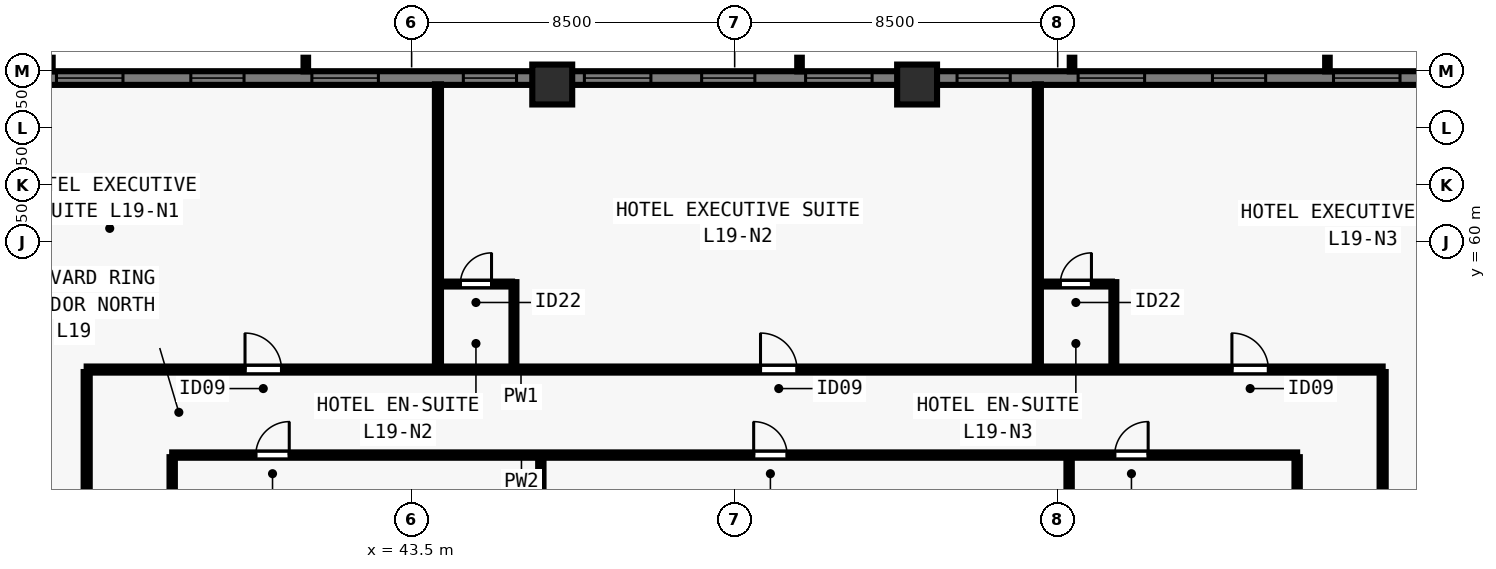
"""IFC4 building model, lengths in metres.
Left out: names, types, materials, properties, quantities, classifications, styles, units other than length and angle.
Written with IfcOpenShell. Run it as: python <this file> out.ifc"""

import sys

from ifc_helpers import new_model, si_unit, direction, frame, frame_2d, origin, origin_2d, place, context, subcontext, project, spatial, rectangle, extrude, element, fill, save


model = new_model("IFC4")
c1 = context("Model", 3, precision=1e-05, world=origin(), true_north=direction((0.0, 1.0)))
c2 = subcontext(c1, "Body", "Model", "MODEL_VIEW")
j1 = project(units=[si_unit("LENGTHUNIT", "METRE"), si_unit("PLANEANGLEUNIT", "RADIAN")], contexts=[c1])
p1 = place(None, origin())
s1 = spatial("IfcSite", under=j1, at=p1, CompositionType="ELEMENT")
p2 = place(p1, origin())
s2 = spatial("IfcBuilding", under=s1, at=p2, CompositionType="ELEMENT")
p3 = place(p2, frame((0.0, 0.0, 72.5)))
s3 = spatial("IfcBuildingStorey", under=s2, at=p3, CompositionType="ELEMENT", Elevation=72.5)
for number, where, z_axis, x_axis in (
    (1, (56.8, 64.15, 0.0), (0.0, 0.0, 1.0), (1.0, 0.0, 0.0)),
    (2, (47.2, 64.15, 0.0), (0.0, 0.0, 1.0), (1.0, 0.0, 0.0)),
):
    element("IfcColumn", number, at=place(p3, frame(where, z_axis=z_axis, x_axis=x_axis)), inside=s3, PredefinedType="COLUMN", context=c2, shape_type="SweptSolid", body=[
        extrude(rectangle(XDim=1.05, YDim=1.05, at=origin_2d()), origin(), (0.0, 0.0, 1.0), 3.5),
    ])
p4 = place(p3, frame((29.5, 64.32, 0.0), z_axis=(0.0, 0.0, 1.0), x_axis=(1.0, 0.0, 0.0)))
e3 = element("IfcWall", 3, at=p4, inside=s3, PredefinedType="SOLIDWALL", context=c2, shape_type="SweptSolid", body=[
    extrude(rectangle(XDim=44.662, YDim=0.36, at=frame_2d((22.331, 0.0))), origin(), (0.0, 0.0, 1.0), 3.28),
])
p5 = place(p4, frame((4.655, 0.0, 0.8)))
e4 = element("IfcOpeningElement", 4, at=p5, cuts=e3, PredefinedType="OPENING", context=c2, shape_type="SweptSolid", body=[
    extrude(rectangle(XDim=1.75, YDim=1.544, at=frame_2d((0.875, 0.772))), frame((0.0, 0.19, 0.0), z_axis=(0.0, -1.0, 0.0), x_axis=(1.0, 0.0, 0.0)), (0.0, 0.0, 1.0), 0.38),
])
p6 = place(p4, frame((8.19, 0.0, 0.8)))
e5 = element("IfcOpeningElement", 5, at=p6, cuts=e3, PredefinedType="OPENING", context=c2, shape_type="SweptSolid", body=[
    extrude(rectangle(XDim=1.4, YDim=1.544, at=frame_2d((0.7, 0.772))), frame((0.0, 0.19, 0.0), z_axis=(0.0, -1.0, 0.0), x_axis=(1.0, 0.0, 0.0)), (0.0, 0.0, 1.0), 0.38),
])
p7 = place(p4, frame((11.375, 0.0, 0.8)))
e6 = element("IfcOpeningElement", 6, at=p7, cuts=e3, PredefinedType="OPENING", context=c2, shape_type="SweptSolid", body=[
    extrude(rectangle(XDim=1.75, YDim=1.544, at=frame_2d((0.875, 0.772))), frame((0.0, 0.19, 0.0), z_axis=(0.0, -1.0, 0.0), x_axis=(1.0, 0.0, 0.0)), (0.0, 0.0, 1.0), 0.38),
])
p8 = place(p4, frame((15.361, 0.0, 0.8)))
e7 = element("IfcOpeningElement", 7, at=p8, cuts=e3, PredefinedType="OPENING", context=c2, shape_type="SweptSolid", body=[
    extrude(rectangle(XDim=1.4, YDim=1.544, at=frame_2d((0.7, 0.772))), frame((0.0, 0.19, 0.0), z_axis=(0.0, -1.0, 0.0), x_axis=(1.0, 0.0, 0.0)), (0.0, 0.0, 1.0), 0.38),
])
p9 = place(p4, frame((18.546, 0.0, 0.8)))
e8 = element("IfcOpeningElement", 8, at=p9, cuts=e3, PredefinedType="OPENING", context=c2, shape_type="SweptSolid", body=[
    extrude(rectangle(XDim=1.75, YDim=1.544, at=frame_2d((0.875, 0.772))), frame((0.0, 0.19, 0.0), z_axis=(0.0, -1.0, 0.0), x_axis=(1.0, 0.0, 0.0)), (0.0, 0.0, 1.0), 0.38),
])
p10 = place(p4, frame((21.631, 0.0, 0.8)))
e9 = element("IfcOpeningElement", 9, at=p10, cuts=e3, PredefinedType="OPENING", context=c2, shape_type="SweptSolid", body=[
    extrude(rectangle(XDim=1.4, YDim=1.544, at=frame_2d((0.7, 0.772))), frame((0.0, 0.19, 0.0), z_axis=(0.0, -1.0, 0.0), x_axis=(1.0, 0.0, 0.0)), (0.0, 0.0, 1.0), 0.38),
])
p11 = place(p4, frame((24.366, 0.0, 0.8)))
e10 = element("IfcOpeningElement", 10, at=p11, cuts=e3, PredefinedType="OPENING", context=c2, shape_type="SweptSolid", body=[
    extrude(rectangle(XDim=1.75, YDim=1.544, at=frame_2d((0.875, 0.772))), frame((0.0, 0.19, 0.0), z_axis=(0.0, -1.0, 0.0), x_axis=(1.0, 0.0, 0.0)), (0.0, 0.0, 1.0), 0.38),
])
p12 = place(p4, frame((28.351, 0.0, 0.8)))
e11 = element("IfcOpeningElement", 11, at=p12, cuts=e3, PredefinedType="OPENING", context=c2, shape_type="SweptSolid", body=[
    extrude(rectangle(XDim=1.4, YDim=1.544, at=frame_2d((0.7, 0.772))), frame((0.0, 0.19, 0.0), z_axis=(0.0, -1.0, 0.0), x_axis=(1.0, 0.0, 0.0)), (0.0, 0.0, 1.0), 0.38),
])
p13 = place(p4, frame((31.537, 0.0, 0.8)))
e12 = element("IfcOpeningElement", 12, at=p13, cuts=e3, PredefinedType="OPENING", context=c2, shape_type="SweptSolid", body=[
    extrude(rectangle(XDim=1.75, YDim=1.544, at=frame_2d((0.875, 0.772))), frame((0.0, 0.19, 0.0), z_axis=(0.0, -1.0, 0.0), x_axis=(1.0, 0.0, 0.0)), (0.0, 0.0, 1.0), 0.38),
])
p14 = place(p4, frame((35.072, 0.0, 0.8)))
e13 = element("IfcOpeningElement", 13, at=p14, cuts=e3, PredefinedType="OPENING", context=c2, shape_type="SweptSolid", body=[
    extrude(rectangle(XDim=1.4, YDim=1.544, at=frame_2d((0.7, 0.772))), frame((0.0, 0.19, 0.0), z_axis=(0.0, -1.0, 0.0), x_axis=(1.0, 0.0, 0.0)), (0.0, 0.0, 1.0), 0.38),
])
p15 = place(p4, frame((38.257, 0.0, 0.8)))
e14 = element("IfcOpeningElement", 14, at=p15, cuts=e3, PredefinedType="OPENING", context=c2, shape_type="SweptSolid", body=[
    extrude(rectangle(XDim=1.75, YDim=1.544, at=frame_2d((0.875, 0.772))), frame((0.0, 0.19, 0.0), z_axis=(0.0, -1.0, 0.0), x_axis=(1.0, 0.0, 0.0)), (0.0, 0.0, 1.0), 0.38),
])
p16 = place(p3, frame((34.95, 56.65, 0.0), z_axis=(0.0, 0.0, 1.0), x_axis=(1.0, 0.0, 0.0)))
e15 = element("IfcWall", 15, at=p16, inside=s3, PredefinedType="PARTITIONING", context=c2, shape_type="SweptSolid", body=[
    extrude(rectangle(XDim=34.1, YDim=0.16, at=frame_2d((17.05, 0.0))), origin(), (0.0, 0.0, 1.0), 3.28),
])
p17 = place(p16, frame((4.166, 0.0, 0.0)))
e16 = element("IfcOpeningElement", 16, at=p17, cuts=e15, PredefinedType="OPENING", context=c2, shape_type="SweptSolid", body=[
    extrude(rectangle(XDim=0.96, YDim=2.15, at=frame_2d((0.48, 1.075))), frame((0.0, 0.09, 0.0), z_axis=(0.0, -1.0, 0.0), x_axis=(1.0, 0.0, 0.0)), (0.0, 0.0, 1.0), 0.18),
])
p18 = place(p16, frame((17.73, 0.0, 0.0)))
e17 = element("IfcOpeningElement", 17, at=p18, cuts=e15, PredefinedType="OPENING", context=c2, shape_type="SweptSolid", body=[
    extrude(rectangle(XDim=0.96, YDim=2.15, at=frame_2d((0.48, 1.075))), frame((0.0, 0.09, 0.0), z_axis=(0.0, -1.0, 0.0), x_axis=(1.0, 0.0, 0.0)), (0.0, 0.0, 1.0), 0.18),
])
p19 = place(p16, frame((30.134, 0.0, 0.0)))
e18 = element("IfcOpeningElement", 18, at=p19, cuts=e15, PredefinedType="OPENING", context=c2, shape_type="SweptSolid", body=[
    extrude(rectangle(XDim=0.96, YDim=2.15, at=frame_2d((0.48, 1.075))), frame((0.0, 0.09, 0.0), z_axis=(0.0, -1.0, 0.0), x_axis=(1.0, 0.0, 0.0)), (0.0, 0.0, 1.0), 0.18),
])
p20 = place(p3, frame((34.95, 21.415, 0.0), z_axis=(0.0, 0.0, 1.0), x_axis=(0.0, 1.0, 0.0)))
e19 = element("IfcWall", 19, at=p20, inside=s3, PredefinedType="PARTITIONING", context=c2, shape_type="SweptSolid", body=[
    extrude(rectangle(XDim=35.17, YDim=0.16, at=frame_2d((17.585, 0.0))), origin(), (0.0, 0.0, 1.0), 3.28),
])
p21 = place(p20, frame((9.414, 0.0, 0.0)))
e20 = element("IfcOpeningElement", 20, at=p21, cuts=e19, PredefinedType="OPENING", context=c2, shape_type="SweptSolid", body=[
    extrude(rectangle(XDim=0.96, YDim=2.15, at=frame_2d((0.48, 1.075))), frame((0.0, 0.09, 0.0), z_axis=(0.0, -1.0, 0.0), x_axis=(1.0, 0.0, 0.0)), (0.0, 0.0, 1.0), 0.18),
])
p22 = place(p20, frame((26.814, 0.0, 0.0)))
e21 = element("IfcOpeningElement", 21, at=p22, cuts=e19, PredefinedType="OPENING", context=c2, shape_type="SweptSolid", body=[
    extrude(rectangle(XDim=0.96, YDim=2.15, at=frame_2d((0.48, 1.075))), frame((0.0, 0.09, 0.0), z_axis=(0.0, -1.0, 0.0), x_axis=(1.0, 0.0, 0.0)), (0.0, 0.0, 1.0), 0.18),
])
p23 = place(p3, frame((69.05, 21.415, 0.0), z_axis=(0.0, 0.0, 1.0), x_axis=(0.0, 1.0, 0.0)))
e22 = element("IfcWall", 22, at=p23, inside=s3, PredefinedType="PARTITIONING", context=c2, shape_type="SweptSolid", body=[
    extrude(rectangle(XDim=35.17, YDim=0.16, at=frame_2d((17.585, 0.0))), origin(), (0.0, 0.0, 1.0), 3.28),
])
p24 = place(p23, frame((9.746, 0.0, 0.0)))
e23 = element("IfcOpeningElement", 23, at=p24, cuts=e22, PredefinedType="OPENING", context=c2, shape_type="SweptSolid", body=[
    extrude(rectangle(XDim=0.96, YDim=2.15, at=frame_2d((0.48, 1.075))), frame((0.0, 0.09, 0.0), z_axis=(0.0, -1.0, 0.0), x_axis=(1.0, 0.0, 0.0)), (0.0, 0.0, 1.0), 0.18),
])
p25 = place(p23, frame((27.146, 0.0, 0.0)))
e24 = element("IfcOpeningElement", 24, at=p25, cuts=e22, PredefinedType="OPENING", context=c2, shape_type="SweptSolid", body=[
    extrude(rectangle(XDim=0.96, YDim=2.15, at=frame_2d((0.48, 1.075))), frame((0.0, 0.09, 0.0), z_axis=(0.0, -1.0, 0.0), x_axis=(1.0, 0.0, 0.0)), (0.0, 0.0, 1.0), 0.18),
])
p26 = place(p3, frame((37.2, 54.4, 0.0), z_axis=(0.0, 0.0, 1.0), x_axis=(1.0, 0.0, 0.0)))
e25 = element("IfcWall", 25, at=p26, inside=s3, PredefinedType="PARTITIONING", context=c2, shape_type="SweptSolid", body=[
    extrude(rectangle(XDim=29.6, YDim=0.14, at=frame_2d((14.8, 0.0))), origin(), (0.0, 0.0, 1.0), 3.28),
])
p27 = place(p26, frame((2.2, 0.0, 0.0)))
e26 = element("IfcOpeningElement", 26, at=p27, cuts=e25, PredefinedType="OPENING", context=c2, shape_type="SweptSolid", body=[
    extrude(rectangle(XDim=0.88, YDim=2.1, at=frame_2d((0.44, 1.05))), frame((0.0, 0.08, 0.0), z_axis=(0.0, -1.0, 0.0), x_axis=(1.0, 0.0, 0.0)), (0.0, 0.0, 1.0), 0.16),
])
p28 = place(p26, frame((15.3, 0.0, 0.0)))
e27 = element("IfcOpeningElement", 27, at=p28, cuts=e25, PredefinedType="OPENING", context=c2, shape_type="SweptSolid", body=[
    extrude(rectangle(XDim=0.88, YDim=2.1, at=frame_2d((0.44, 1.05))), frame((0.0, 0.08, 0.0), z_axis=(0.0, -1.0, 0.0), x_axis=(1.0, 0.0, 0.0)), (0.0, 0.0, 1.0), 0.16),
])
p29 = place(p26, frame((24.8, 0.0, 0.0)))
e28 = element("IfcOpeningElement", 28, at=p29, cuts=e25, PredefinedType="OPENING", context=c2, shape_type="SweptSolid", body=[
    extrude(rectangle(XDim=0.88, YDim=2.1, at=frame_2d((0.44, 1.05))), frame((0.0, 0.08, 0.0), z_axis=(0.0, -1.0, 0.0), x_axis=(1.0, 0.0, 0.0)), (0.0, 0.0, 1.0), 0.16),
])
p30 = place(p3, frame((37.2, 40.8, 0.0), z_axis=(0.0, 0.0, 1.0), x_axis=(0.0, 1.0, 0.0)))
e29 = element("IfcWall", 29, at=p30, inside=s3, PredefinedType="PARTITIONING", context=c2, shape_type="SweptSolid", body=[
    extrude(rectangle(XDim=13.545, YDim=0.14, at=frame_2d((6.772, 0.0))), origin(), (0.0, 0.0, 1.0), 3.28),
])
p31 = place(p30, frame((2.5, 0.0, 0.0)))
e30 = element("IfcOpeningElement", 30, at=p31, cuts=e29, PredefinedType="OPENING", context=c2, shape_type="SweptSolid", body=[
    extrude(rectangle(XDim=0.88, YDim=2.1, at=frame_2d((0.44, 1.05))), frame((0.0, 0.08, 0.0), z_axis=(0.0, -1.0, 0.0), x_axis=(1.0, 0.0, 0.0)), (0.0, 0.0, 1.0), 0.16),
])
p32 = place(p3, frame((66.8, 40.8, 0.0), z_axis=(0.0, 0.0, 1.0), x_axis=(0.0, 1.0, 0.0)))
e31 = element("IfcWall", 31, at=p32, inside=s3, PredefinedType="PARTITIONING", context=c2, shape_type="SweptSolid", body=[
    extrude(rectangle(XDim=13.545, YDim=0.14, at=frame_2d((6.772, 0.0))), origin(), (0.0, 0.0, 1.0), 3.28),
])
p33 = place(p32, frame((2.5, 0.0, 0.0)))
e32 = element("IfcOpeningElement", 32, at=p33, cuts=e31, PredefinedType="OPENING", context=c2, shape_type="SweptSolid", body=[
    extrude(rectangle(XDim=0.88, YDim=2.1, at=frame_2d((0.44, 1.05))), frame((0.0, 0.08, 0.0), z_axis=(0.0, -1.0, 0.0), x_axis=(1.0, 0.0, 0.0)), (0.0, 0.0, 1.0), 0.16),
])
p34 = place(p3, frame((46.9, 47.76, 0.0), z_axis=(0.0, 0.0, 1.0), x_axis=(0.0, 1.0, 0.0)))
e33 = element("IfcWall", 33, at=p34, inside=s3, PredefinedType="PARTITIONING", context=c2, shape_type="SweptSolid", body=[
    extrude(rectangle(XDim=6.585, YDim=0.14, at=frame_2d((3.292, 0.0))), origin(), (0.0, 0.0, 1.0), 3.28),
])
p35 = place(p3, frame((60.8, 47.76, 0.0), z_axis=(0.0, 0.0, 1.0), x_axis=(0.0, 1.0, 0.0)))
e34 = element("IfcWall", 34, at=p35, inside=s3, PredefinedType="PARTITIONING", context=c2, shape_type="SweptSolid", body=[
    extrude(rectangle(XDim=6.585, YDim=0.14, at=frame_2d((3.292, 0.0))), origin(), (0.0, 0.0, 1.0), 2.439),
])
p36 = place(p3, frame((44.192, 56.715, 0.0), z_axis=(0.0, 0.0, 1.0), x_axis=(0.0, 1.0, 0.0)))
e35 = element("IfcWall", 35, at=p36, inside=s3, PredefinedType="PARTITIONING", context=c2, shape_type="SweptSolid", body=[
    extrude(rectangle(XDim=7.44, YDim=0.16, at=frame_2d((3.72, 0.0))), origin(), (0.0, 0.0, 1.0), 3.28),
])
p37 = place(p3, frame((46.192, 56.715, 0.0), z_axis=(0.0, 0.0, 1.0), x_axis=(0.0, 1.0, 0.0)))
e36 = element("IfcWall", 36, at=p37, inside=s3, PredefinedType="PLUMBINGWALL", context=c2, shape_type="SweptSolid", body=[
    extrude(rectangle(XDim=2.235, YDim=0.13, at=frame_2d((1.117, 0.0))), origin(), (0.0, 0.0, 1.0), 3.28),
])
p38 = place(p3, frame((44.258, 58.9, 0.0), z_axis=(0.0, 0.0, 1.0), x_axis=(1.0, 0.0, 0.0)))
e37 = element("IfcWall", 37, at=p38, inside=s3, PredefinedType="PLUMBINGWALL", context=c2, shape_type="SweptSolid", body=[
    extrude(rectangle(XDim=1.885, YDim=0.13, at=frame_2d((0.942, 0.0))), origin(), (0.0, 0.0, 1.0), 3.28),
])
p39 = place(p38, frame((0.525, 0.0, 0.0)))
e38 = element("IfcOpeningElement", 38, at=p39, cuts=e37, PredefinedType="OPENING", context=c2, shape_type="SweptSolid", body=[
    extrude(rectangle(XDim=0.82, YDim=2.1, at=frame_2d((0.41, 1.05))), frame((0.0, 0.075, 0.0), z_axis=(0.0, -1.0, 0.0), x_axis=(1.0, 0.0, 0.0)), (0.0, 0.0, 1.0), 0.15),
])
p40 = place(p3, frame((59.978, 56.715, 0.0), z_axis=(0.0, 0.0, 1.0), x_axis=(0.0, 1.0, 0.0)))
e39 = element("IfcWall", 39, at=p40, inside=s3, PredefinedType="PARTITIONING", context=c2, shape_type="SweptSolid", body=[
    extrude(rectangle(XDim=7.44, YDim=0.16, at=frame_2d((3.72, 0.0))), origin(), (0.0, 0.0, 1.0), 3.28),
])
p41 = place(p3, frame((61.978, 56.715, 0.0), z_axis=(0.0, 0.0, 1.0), x_axis=(0.0, 1.0, 0.0)))
e40 = element("IfcWall", 40, at=p41, inside=s3, PredefinedType="PLUMBINGWALL", context=c2, shape_type="SweptSolid", body=[
    extrude(rectangle(XDim=2.235, YDim=0.13, at=frame_2d((1.117, 0.0))), origin(), (0.0, 0.0, 1.0), 3.28),
])
p42 = place(p3, frame((60.042, 58.9, 0.0), z_axis=(0.0, 0.0, 1.0), x_axis=(1.0, 0.0, 0.0)))
e41 = element("IfcWall", 41, at=p42, inside=s3, PredefinedType="PLUMBINGWALL", context=c2, shape_type="SweptSolid", body=[
    extrude(rectangle(XDim=1.885, YDim=0.13, at=frame_2d((0.942, 0.0))), origin(), (0.0, 0.0, 1.0), 3.28),
])
p43 = place(p42, frame((0.525, 0.0, 0.0)))
e42 = element("IfcOpeningElement", 42, at=p43, cuts=e41, PredefinedType="OPENING", context=c2, shape_type="SweptSolid", body=[
    extrude(rectangle(XDim=0.82, YDim=2.1, at=frame_2d((0.41, 1.05))), frame((0.0, 0.075, 0.0), z_axis=(0.0, -1.0, 0.0), x_axis=(1.0, 0.0, 0.0)), (0.0, 0.0, 1.0), 0.15),
])
p44 = place(p5, origin())
e43 = element("IfcWindow", 43, at=p44, inside=s3, PartitioningType="SINGLE_PANEL", PredefinedType="WINDOW", context=c2, shape_type="SweptSolid", body=[
    extrude(rectangle(XDim=1.75, YDim=1.544, at=frame_2d((0.875, 0.772))), frame((0.0, -0.05, 0.0), z_axis=(0.0, -1.0, 0.0), x_axis=(1.0, 0.0, 0.0)), (0.0, 0.0, 1.0), 0.06),
])
fill(e4, e43)
p45 = place(p6, origin())
e44 = element("IfcWindow", 44, at=p45, inside=s3, PartitioningType="SINGLE_PANEL", PredefinedType="WINDOW", context=c2, shape_type="SweptSolid", body=[
    extrude(rectangle(XDim=1.4, YDim=1.544, at=frame_2d((0.7, 0.772))), frame((0.0, -0.05, 0.0), z_axis=(0.0, -1.0, 0.0), x_axis=(1.0, 0.0, 0.0)), (0.0, 0.0, 1.0), 0.06),
])
fill(e5, e44)
p46 = place(p7, origin())
e45 = element("IfcWindow", 45, at=p46, inside=s3, PartitioningType="SINGLE_PANEL", PredefinedType="WINDOW", context=c2, shape_type="SweptSolid", body=[
    extrude(rectangle(XDim=1.75, YDim=1.544, at=frame_2d((0.875, 0.772))), frame((0.0, -0.05, 0.0), z_axis=(0.0, -1.0, 0.0), x_axis=(1.0, 0.0, 0.0)), (0.0, 0.0, 1.0), 0.06),
])
fill(e6, e45)
p47 = place(p8, origin())
e46 = element("IfcWindow", 46, at=p47, inside=s3, PartitioningType="SINGLE_PANEL", PredefinedType="WINDOW", context=c2, shape_type="SweptSolid", body=[
    extrude(rectangle(XDim=1.4, YDim=1.544, at=frame_2d((0.7, 0.772))), frame((0.0, -0.05, 0.0), z_axis=(0.0, -1.0, 0.0), x_axis=(1.0, 0.0, 0.0)), (0.0, 0.0, 1.0), 0.06),
])
fill(e7, e46)
p48 = place(p9, origin())
e47 = element("IfcWindow", 47, at=p48, inside=s3, PartitioningType="SINGLE_PANEL", PredefinedType="WINDOW", context=c2, shape_type="SweptSolid", body=[
    extrude(rectangle(XDim=1.75, YDim=1.544, at=frame_2d((0.875, 0.772))), frame((0.0, -0.05, 0.0), z_axis=(0.0, -1.0, 0.0), x_axis=(1.0, 0.0, 0.0)), (0.0, 0.0, 1.0), 0.06),
])
fill(e8, e47)
p49 = place(p10, origin())
e48 = element("IfcWindow", 48, at=p49, inside=s3, PartitioningType="SINGLE_PANEL", PredefinedType="WINDOW", context=c2, shape_type="SweptSolid", body=[
    extrude(rectangle(XDim=1.4, YDim=1.544, at=frame_2d((0.7, 0.772))), frame((0.0, -0.05, 0.0), z_axis=(0.0, -1.0, 0.0), x_axis=(1.0, 0.0, 0.0)), (0.0, 0.0, 1.0), 0.06),
])
fill(e9, e48)
p50 = place(p11, origin())
e49 = element("IfcWindow", 49, at=p50, inside=s3, PartitioningType="SINGLE_PANEL", PredefinedType="WINDOW", context=c2, shape_type="SweptSolid", body=[
    extrude(rectangle(XDim=1.75, YDim=1.544, at=frame_2d((0.875, 0.772))), frame((0.0, -0.05, 0.0), z_axis=(0.0, -1.0, 0.0), x_axis=(1.0, 0.0, 0.0)), (0.0, 0.0, 1.0), 0.06),
])
fill(e10, e49)
p51 = place(p12, origin())
e50 = element("IfcWindow", 50, at=p51, inside=s3, PartitioningType="SINGLE_PANEL", PredefinedType="WINDOW", context=c2, shape_type="SweptSolid", body=[
    extrude(rectangle(XDim=1.4, YDim=1.544, at=frame_2d((0.7, 0.772))), frame((0.0, -0.05, 0.0), z_axis=(0.0, -1.0, 0.0), x_axis=(1.0, 0.0, 0.0)), (0.0, 0.0, 1.0), 0.06),
])
fill(e11, e50)
p52 = place(p13, origin())
e51 = element("IfcWindow", 51, at=p52, inside=s3, PartitioningType="SINGLE_PANEL", PredefinedType="WINDOW", context=c2, shape_type="SweptSolid", body=[
    extrude(rectangle(XDim=1.75, YDim=1.544, at=frame_2d((0.875, 0.772))), frame((0.0, -0.05, 0.0), z_axis=(0.0, -1.0, 0.0), x_axis=(1.0, 0.0, 0.0)), (0.0, 0.0, 1.0), 0.06),
])
fill(e12, e51)
p53 = place(p14, origin())
e52 = element("IfcWindow", 52, at=p53, inside=s3, PartitioningType="SINGLE_PANEL", PredefinedType="WINDOW", context=c2, shape_type="SweptSolid", body=[
    extrude(rectangle(XDim=1.4, YDim=1.544, at=frame_2d((0.7, 0.772))), frame((0.0, -0.05, 0.0), z_axis=(0.0, -1.0, 0.0), x_axis=(1.0, 0.0, 0.0)), (0.0, 0.0, 1.0), 0.06),
])
fill(e13, e52)
p54 = place(p15, origin())
e53 = element("IfcWindow", 53, at=p54, inside=s3, PartitioningType="SINGLE_PANEL", PredefinedType="WINDOW", context=c2, shape_type="SweptSolid", body=[
    extrude(rectangle(XDim=1.75, YDim=1.544, at=frame_2d((0.875, 0.772))), frame((0.0, -0.05, 0.0), z_axis=(0.0, -1.0, 0.0), x_axis=(1.0, 0.0, 0.0)), (0.0, 0.0, 1.0), 0.06),
])
fill(e14, e53)
p55 = place(p27, origin())
e54 = element("IfcDoor", 54, at=p55, inside=s3, OperationType="SINGLE_SWING_RIGHT", PredefinedType="DOOR", context=c2, shape_type="SweptSolid", body=[
    extrude(rectangle(XDim=0.88, YDim=2.1, at=frame_2d((0.44, 1.05))), frame((0.0, 0.025, 0.0), z_axis=(0.0, -1.0, 0.0), x_axis=(1.0, 0.0, 0.0)), (0.0, 0.0, 1.0), 0.05),
])
fill(e26, e54)
p56 = place(p28, origin())
e55 = element("IfcDoor", 55, at=p56, inside=s3, OperationType="SINGLE_SWING_LEFT", PredefinedType="DOOR", context=c2, shape_type="SweptSolid", body=[
    extrude(rectangle(XDim=0.88, YDim=2.1, at=frame_2d((0.44, 1.05))), frame((0.0, 0.025, 0.0), z_axis=(0.0, -1.0, 0.0), x_axis=(1.0, 0.0, 0.0)), (0.0, 0.0, 1.0), 0.05),
])
fill(e27, e55)
p57 = place(p29, origin())
e56 = element("IfcDoor", 56, at=p57, inside=s3, OperationType="SINGLE_SWING_RIGHT", PredefinedType="DOOR", context=c2, shape_type="SweptSolid", body=[
    extrude(rectangle(XDim=0.88, YDim=2.1, at=frame_2d((0.44, 1.05))), frame((0.0, 0.025, 0.0), z_axis=(0.0, -1.0, 0.0), x_axis=(1.0, 0.0, 0.0)), (0.0, 0.0, 1.0), 0.05),
])
fill(e28, e56)
p58 = place(p17, origin())
e57 = element("IfcDoor", 57, at=p58, inside=s3, OperationType="SINGLE_SWING_LEFT", PredefinedType="DOOR", context=c2, shape_type="SweptSolid", body=[
    extrude(rectangle(XDim=0.96, YDim=2.15, at=frame_2d((0.48, 1.075))), frame((0.0, 0.025, 0.0), z_axis=(0.0, -1.0, 0.0), x_axis=(1.0, 0.0, 0.0)), (0.0, 0.0, 1.0), 0.05),
])
fill(e16, e57)
p59 = place(p39, origin())
e58 = element("IfcDoor", 58, at=p59, inside=s3, OperationType="SINGLE_SWING_RIGHT", PredefinedType="DOOR", context=c2, shape_type="SweptSolid", body=[
    extrude(rectangle(XDim=0.82, YDim=2.1, at=frame_2d((0.41, 1.05))), frame((0.0, 0.025, 0.0), z_axis=(0.0, -1.0, 0.0), x_axis=(1.0, 0.0, 0.0)), (0.0, 0.0, 1.0), 0.05),
])
fill(e38, e58)
p60 = place(p18, origin())
e59 = element("IfcDoor", 59, at=p60, inside=s3, OperationType="SINGLE_SWING_LEFT", PredefinedType="DOOR", context=c2, shape_type="SweptSolid", body=[
    extrude(rectangle(XDim=0.96, YDim=2.15, at=frame_2d((0.48, 1.075))), frame((0.0, 0.025, 0.0), z_axis=(0.0, -1.0, 0.0), x_axis=(1.0, 0.0, 0.0)), (0.0, 0.0, 1.0), 0.05),
])
fill(e17, e59)
p61 = place(p43, origin())
e60 = element("IfcDoor", 60, at=p61, inside=s3, OperationType="SINGLE_SWING_RIGHT", PredefinedType="DOOR", context=c2, shape_type="SweptSolid", body=[
    extrude(rectangle(XDim=0.82, YDim=2.1, at=frame_2d((0.41, 1.05))), frame((0.0, 0.025, 0.0), z_axis=(0.0, -1.0, 0.0), x_axis=(1.0, 0.0, 0.0)), (0.0, 0.0, 1.0), 0.05),
])
fill(e42, e60)
p62 = place(p19, origin())
e61 = element("IfcDoor", 61, at=p62, inside=s3, OperationType="SINGLE_SWING_LEFT", PredefinedType="DOOR", context=c2, shape_type="SweptSolid", body=[
    extrude(rectangle(XDim=0.96, YDim=2.15, at=frame_2d((0.48, 1.075))), frame((0.0, 0.025, 0.0), z_axis=(0.0, -1.0, 0.0), x_axis=(1.0, 0.0, 0.0)), (0.0, 0.0, 1.0), 0.05),
])
fill(e18, e61)
save(model, sys.argv[1])
